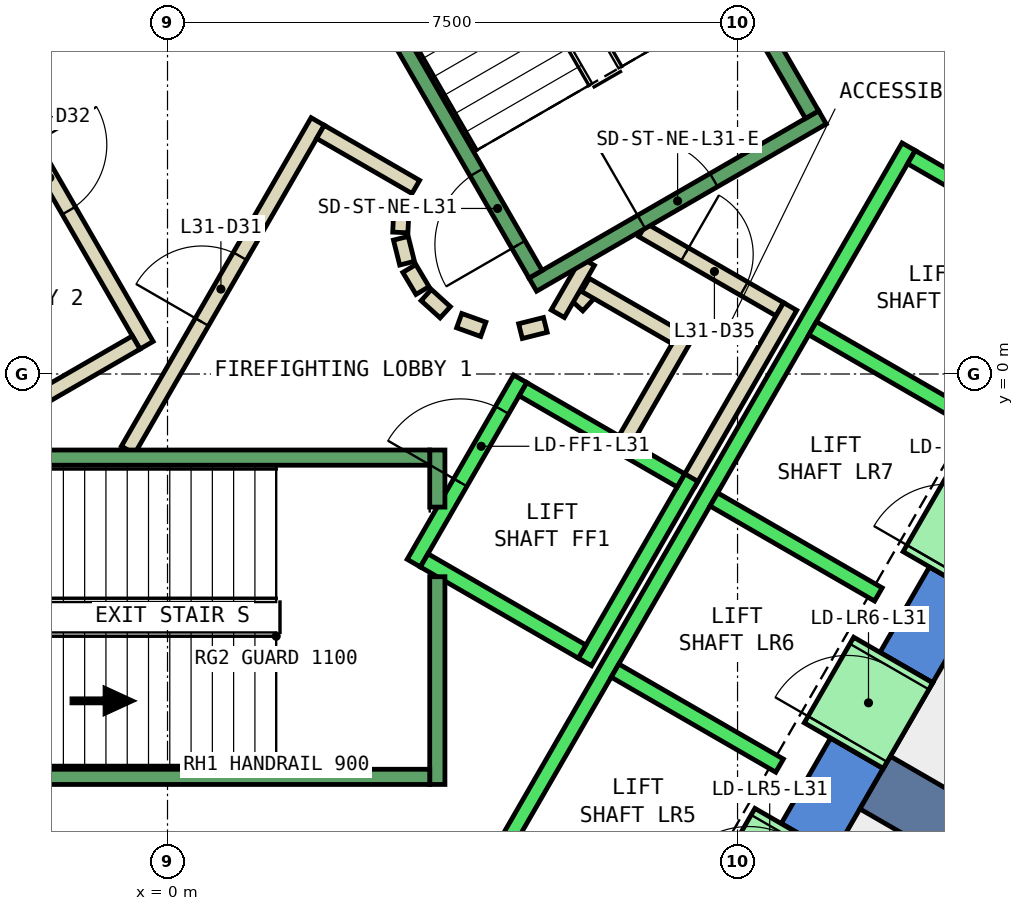
"""IFC4 building model, lengths in metres.
Left out: names, types, materials, properties, quantities, classifications, styles, units other than length and angle.
Written with IfcOpenShell. Run it as: python <this file> out.ifc"""

import sys

from ifc_helpers import new_model, si_unit, direction, frame, frame_2d, origin, place, context, subcontext, project, spatial, polyline, rectangle, outline, extrude, element, fill, save


model = new_model("IFC4")
c1 = context("Model", 3, precision=1e-05, world=origin(), true_north=direction((0.0, 1.0)))
c2 = subcontext(c1, "Body", "Model", "MODEL_VIEW")
j1 = project(units=[si_unit("LENGTHUNIT", "METRE"), si_unit("PLANEANGLEUNIT", "RADIAN")], contexts=[c1])
p1 = place(None, origin())
s1 = spatial("IfcSite", under=j1, at=p1, CompositionType="ELEMENT")
p2 = place(p1, origin())
s2 = spatial("IfcBuilding", under=s1, at=p2, CompositionType="ELEMENT")
p3 = place(p2, frame((0.0, 0.0, 142.4)))
s3 = spatial("IfcBuildingStorey", under=s2, at=p3, CompositionType="ELEMENT", Elevation=142.4)
p4 = place(p3, frame((0.0, 0.0, -0.4)))
e1 = element("IfcWall", 1, at=p4, inside=s3, PredefinedType="SHEAR", context=c2, shape_type="SweptSolid", body=[
    extrude(outline(polyline([(8.517, 11.748), (7.824, 11.348), (12.933, 2.5), (13.856, 2.5), (8.517, 11.748)])), origin(), (0.0, 0.0, 1.0), 4.2),
])
p5 = place(p3, frame((0.0, 0.0, -0.4)))
e2 = element("IfcWall", 2, at=p5, inside=s3, PredefinedType="SHEAR", context=c2, shape_type="SweptSolid", body=[
    extrude(outline(polyline([(9.417, -5.189), (8.724, -4.789), (8.075, -5.914), (8.767, -6.314), (9.417, -5.189)])), origin(), (0.0, 0.0, 1.0), 4.2),
])
p6 = place(p3, frame((0.0, 0.0, -0.4)))
e3 = element("IfcWall", 3, at=p6, inside=s3, PredefinedType="SHEAR", context=c2, shape_type="SweptSolid", body=[
    extrude(outline(polyline([(10.717, -2.937), (10.025, -2.537), (9.374, -3.663), (10.067, -4.063), (10.717, -2.937)])), origin(), (0.0, 0.0, 1.0), 4.2),
])
p7 = place(p3, frame((0.0, 0.0, 3.6)))
e4 = element("IfcWall", 4, at=p7, inside=s3, PredefinedType="SHEAR", context=c2, shape_type="SweptSolid", body=[
    extrude(outline(polyline([(8.767, -6.314), (8.075, -5.914), (7.424, -7.04), (8.117, -7.44), (8.767, -6.314)])), origin(), (0.0, 0.0, 1.0), 0.2),
])
p8 = place(p3, frame((0.0, 0.0, 3.6)))
e5 = element("IfcWall", 5, at=p8, inside=s3, PredefinedType="SHEAR", context=c2, shape_type="SweptSolid", body=[
    extrude(outline(polyline([(10.067, -4.063), (9.374, -3.663), (8.724, -4.789), (9.417, -5.189), (10.067, -4.063)])), origin(), (0.0, 0.0, 1.0), 0.2),
])
p9 = place(p3, frame((0.0, 0.0, 3.6)))
e6 = element("IfcWall", 6, at=p9, inside=s3, PredefinedType="SHEAR", context=c2, shape_type="SweptSolid", body=[
    extrude(outline(polyline([(11.367, -1.811), (10.675, -1.411), (10.025, -2.537), (10.717, -2.937), (11.367, -1.811)])), origin(), (0.0, 0.0, 1.0), 0.2),
])
p10 = place(p3, frame((9.31, -5.375, -0.4), z_axis=(0.0, 0.0, 1.0), x_axis=(0.866017533419, -0.500013631625, 0.0)))
e7 = element("IfcWall", 7, at=p10, inside=s3, PredefinedType="SHEAR", context=c2, shape_type="SweptSolid", body=[
    extrude(rectangle(XDim=9.0, YDim=0.8, at=frame_2d((4.5, 0.0))), origin(), (0.0, 0.0, 1.0), 4.2),
])
p11 = place(p3, frame((5.39, 0.898, 0.0), z_axis=(0.0, 0.0, 1.0), x_axis=(0.673828488714, 0.738887791073, 0.0)))
e8 = element("IfcWall", 8, at=p11, inside=s3, PredefinedType="PARTITIONING", context=c2, shape_type="SweptSolid", body=[
    extrude(rectangle(XDim=0.263, YDim=0.2, at=frame_2d((0.131, 0.0))), origin(), (0.0, 0.0, 1.0), 3.8),
])
p12 = place(p3, frame((5.499, 1.172, 0.0), z_axis=(0.0, 0.0, 1.0), x_axis=(0.866333505267, -0.499465972466, 0.0)))
e9 = element("IfcWall", 9, at=p12, inside=s3, PredefinedType="PARTITIONING", context=c2, shape_type="SweptSolid", body=[
    extrude(rectangle(XDim=1.374, YDim=0.2, at=frame_2d((0.687, 0.0))), origin(), (0.0, 0.0, 1.0), 3.8),
])
p13 = place(p3, frame((6.826, 0.522, 0.0), z_axis=(0.0, 0.0, 1.0), x_axis=(-0.500016722714, -0.866015748706, 0.0)))
e10 = element("IfcWall", 10, at=p13, inside=s3, PredefinedType="PARTITIONING", context=c2, shape_type="SweptSolid", body=[
    extrude(rectangle(XDim=1.7, YDim=0.2, at=frame_2d((0.85, 0.0))), origin(), (0.0, 0.0, 1.0), 3.8),
])
p14 = place(p3, frame((6.25, 1.894, 0.0), z_axis=(0.0, 0.0, 1.0), x_axis=(0.866043184279, -0.499969202016, 0.0)))
e11 = element("IfcWall", 11, at=p14, inside=s3, PredefinedType="PARTITIONING", context=c2, shape_type="SweptSolid", body=[
    extrude(rectangle(XDim=2.084, YDim=0.2, at=frame_2d((1.042, 0.0))), origin(), (0.0, 0.0, 1.0), 3.8),
])
p15 = place(p14, frame((0.642, 0.0, 0.0)))
e12 = element("IfcOpeningElement", 12, at=p15, cuts=e11, PredefinedType="OPENING", context=c2, shape_type="SweptSolid", body=[
    extrude(rectangle(XDim=0.9, YDim=2.1, at=frame_2d((0.45, 1.05))), frame((0.0, 0.11, 0.0), z_axis=(0.0, -1.0, 0.0), x_axis=(1.0, 0.0, 0.0)), (0.0, 0.0, 1.0), 0.22),
])
p16 = place(p3, frame((8.192, 0.888, 0.0), z_axis=(0.0, 0.0, 1.0), x_axis=(-0.499940625693, -0.866059680843, 0.0)))
e13 = element("IfcWall", 13, at=p16, inside=s3, PredefinedType="PARTITIONING", context=c2, shape_type="SweptSolid", body=[
    extrude(rectangle(XDim=2.68, YDim=0.2, at=frame_2d((1.34, 0.0))), origin(), (0.0, 0.0, 1.0), 3.8),
])
p17 = place(p3, frame((5.135, 0.793, 0.0), z_axis=(0.0, 0.0, 1.0), x_axis=(0.499526442893, 0.866298639529, 0.0)))
e14 = element("IfcWall", 14, at=p17, inside=s3, PredefinedType="PARTITIONING", context=c2, shape_type="SweptSolid", body=[
    extrude(rectangle(XDim=0.791, YDim=0.2, at=frame_2d((0.396, 0.0))), origin(), (0.0, 0.0, 1.0), 3.8),
])
p18 = place(p3, frame((-0.52, -1.0, 0.0), z_axis=(0.0, 0.0, 1.0), x_axis=(0.50011622646, 0.865958290007, 0.0)))
e15 = element("IfcWall", 15, at=p18, inside=s3, PredefinedType="PARTITIONING", context=c2, shape_type="SweptSolid", body=[
    extrude(rectangle(XDim=4.991, YDim=0.2, at=frame_2d((2.496, 0.0))), origin(), (0.0, 0.0, 1.0), 3.8),
])
p19 = place(p18, frame((1.945, 0.0, 0.0)))
e16 = element("IfcOpeningElement", 16, at=p19, cuts=e15, PredefinedType="OPENING", context=c2, shape_type="SweptSolid", body=[
    extrude(rectangle(XDim=1.0, YDim=2.1, at=frame_2d((0.5, 1.05))), frame((0.0, 0.11, 0.0), z_axis=(0.0, -1.0, 0.0), x_axis=(1.0, 0.0, 0.0)), (0.0, 0.0, 1.0), 0.22),
])
p20 = place(p3, frame((2.012, 3.186, 0.0), z_axis=(0.0, 0.0, 1.0), x_axis=(0.865891012941, -0.500232699559, 0.0)))
e17 = element("IfcWall", 17, at=p20, inside=s3, PredefinedType="PARTITIONING", context=c2, shape_type="SweptSolid", body=[
    extrude(rectangle(XDim=1.449, YDim=0.2, at=frame_2d((0.725, 0.0))), origin(), (0.0, 0.0, 1.0), 3.8),
])
p21 = place(p3, frame((3.079, 2.199, 0.0), z_axis=(0.0, 0.0, 1.0), x_axis=(-0.047771483479, -0.998858290933, 0.0)))
e18 = element("IfcWall", 18, at=p21, inside=s3, PredefinedType="PARTITIONING", context=c2, shape_type="SweptSolid", body=[
    extrude(rectangle(XDim=0.337, YDim=0.2, at=frame_2d((0.169, 0.0))), origin(), (0.0, 0.0, 1.0), 3.8),
])
p22 = place(p3, frame((3.07, 1.786, 0.0), z_axis=(0.0, 0.0, 1.0), x_axis=(0.242705583207, -0.970099994784, 0.0)))
e19 = element("IfcWall", 19, at=p22, inside=s3, PredefinedType="PARTITIONING", context=c2, shape_type="SweptSolid", body=[
    extrude(rectangle(XDim=0.338, YDim=0.2, at=frame_2d((0.169, 0.0))), origin(), (0.0, 0.0, 1.0), 3.8),
])
for number, where, z_axis, x_axis in (
    (20, (3.182, 1.388, 0.0), (0.0, 0.0, 1.0), (0.512, -0.859, 0.0)),
    (21, (3.404, 1.039, 0.0), (0.0, 0.0, 1.0), (0.74, -0.672, 0.0)),
):
    element("IfcWall", number, at=place(p3, frame(where, z_axis=z_axis, x_axis=x_axis)), inside=s3, PredefinedType="PARTITIONING", context=c2, shape_type="SweptSolid", body=[
        extrude(rectangle(XDim=0.338, YDim=0.2, at=frame_2d((0.169, 0.0))), origin(), (0.0, 0.0, 1.0), 3.8),
    ])
p23 = place(p3, frame((3.838, 0.702, 0.0), z_axis=(0.0, 0.0, 1.0), x_axis=(0.941035081519, -0.338308993895, 0.0)))
e22 = element("IfcWall", 22, at=p23, inside=s3, PredefinedType="PARTITIONING", context=c2, shape_type="SweptSolid", body=[
    extrude(rectangle(XDim=0.337, YDim=0.2, at=frame_2d((0.168, 0.0))), origin(), (0.0, 0.0, 1.0), 3.8),
])
p24 = place(p3, frame((4.644, 0.564, 0.0), z_axis=(0.0, 0.0, 1.0), x_axis=(0.969929076366, 0.243387729394, 0.0)))
e23 = element("IfcWall", 23, at=p24, inside=s3, PredefinedType="PARTITIONING", context=c2, shape_type="SweptSolid", body=[
    extrude(rectangle(XDim=0.337, YDim=0.2, at=frame_2d((0.168, 0.0))), origin(), (0.0, 0.0, 1.0), 3.8),
])
p25 = place(p3, frame((-2.771, 4.7, 0.0), z_axis=(0.0, 0.0, 1.0), x_axis=(0.499969479948, -0.866043023828, 0.0)))
e24 = element("IfcWall", 24, at=p25, inside=s3, PredefinedType="PARTITIONING", context=c2, shape_type="SweptSolid", body=[
    extrude(rectangle(XDim=4.99, YDim=0.2, at=frame_2d((2.495, 0.0))), origin(), (0.0, 0.0, 1.0), 3.8),
])
p26 = place(p25, frame((1.945, 0.0, 0.0)))
e25 = element("IfcOpeningElement", 25, at=p26, cuts=e24, PredefinedType="OPENING", context=c2, shape_type="SweptSolid", body=[
    extrude(rectangle(XDim=1.0, YDim=2.1, at=frame_2d((0.5, 1.05))), frame((0.0, 0.11, 0.0), z_axis=(0.0, -1.0, 0.0), x_axis=(1.0, 0.0, 0.0)), (0.0, 0.0, 1.0), 0.22),
])
p27 = place(p3, frame((-0.412, 0.414, 0.0), z_axis=(0.0, 0.0, 1.0), x_axis=(-0.866017369001, -0.500013916395, 0.0)))
e26 = element("IfcWall", 26, at=p27, inside=s3, PredefinedType="PARTITIONING", context=c2, shape_type="SweptSolid", body=[
    extrude(rectangle(XDim=1.45, YDim=0.2, at=frame_2d((0.725, 0.0))), origin(), (0.0, 0.0, 1.0), 3.8),
])
p28 = place(p3, frame((3.24, -2.488, 0.0), z_axis=(0.0, 0.0, 1.0), x_axis=(0.49994636267, 0.866056369097, 0.0)))
e27 = element("IfcWall", 27, at=p28, inside=s3, PredefinedType="STANDARD", context=c2, shape_type="SweptSolid", body=[
    extrude(rectangle(XDim=2.8, YDim=0.2, at=frame_2d((1.4, 0.0))), origin(), (0.0, 0.0, 1.0), 3.8),
])
p29 = place(p28, frame((1.225, 0.0, 0.0)))
e28 = element("IfcOpeningElement", 28, at=p29, cuts=e27, PredefinedType="OPENING", context=c2, shape_type="SweptSolid", body=[
    extrude(rectangle(XDim=1.1, YDim=2.1, at=frame_2d((0.55, 1.05))), frame((0.0, 0.11, 0.0), z_axis=(0.0, -1.0, 0.0), x_axis=(1.0, 0.0, 0.0)), (0.0, 0.0, 1.0), 0.22),
])
p30 = place(p3, frame((5.492, -3.788, 0.0), z_axis=(0.0, 0.0, 1.0), x_axis=(0.500011755427, 0.866018616679, 0.0)))
e29 = element("IfcWall", 29, at=p30, inside=s3, PredefinedType="STANDARD", context=c2, shape_type="SweptSolid", body=[
    extrude(rectangle(XDim=2.8, YDim=0.2, at=frame_2d((1.4, 0.0))), origin(), (0.0, 0.0, 1.0), 3.8),
])
p31 = place(p3, frame((3.377, -2.452, 0.0), z_axis=(0.0, 0.0, 1.0), x_axis=(0.865955154139, -0.50012165622, 0.0)))
e30 = element("IfcWall", 30, at=p31, inside=s3, PredefinedType="STANDARD", context=c2, shape_type="SweptSolid", body=[
    extrude(rectangle(XDim=2.4, YDim=0.2, at=frame_2d((1.2, 0.0))), origin(), (0.0, 0.0, 1.0), 3.8),
])
p32 = place(p3, frame((4.677, -0.2, 0.0), z_axis=(0.0, 0.0, 1.0), x_axis=(0.865973769406, -0.500089422704, 0.0)))
e31 = element("IfcWall", 31, at=p32, inside=s3, PredefinedType="STANDARD", context=c2, shape_type="SweptSolid", body=[
    extrude(rectangle(XDim=2.399, YDim=0.2, at=frame_2d((1.2, 0.0))), origin(), (0.0, 0.0, 1.0), 3.8),
])
p33 = place(p3, frame((4.451, -6.19, 0.0), z_axis=(0.0, 0.0, 1.0), x_axis=(0.50000090737, 0.866024879913, 0.0)))
e32 = element("IfcWall", 32, at=p33, inside=s3, PredefinedType="STANDARD", context=c2, shape_type="SweptSolid", body=[
    extrude(rectangle(XDim=10.6, YDim=0.2, at=frame_2d((5.3, 0.0))), origin(), (0.0, 0.0, 1.0), 3.8),
])
for number, where, z_axis, x_axis in (
    (33, (5.888, -3.902, 0.0), (0.0, 0.0, 1.0), (0.866, -0.5, 0.0)),
    (34, (7.188, -1.65, 0.0), (0.0, 0.0, 1.0), (0.866, -0.5, 0.0)),
    (35, (8.488, 0.602, 0.0), (0.0, 0.0, 1.0), (0.866, -0.5, 0.0)),
):
    element("IfcWall", number, at=place(p3, frame(where, z_axis=z_axis, x_axis=x_axis)), inside=s3, PredefinedType="STANDARD", context=c2, shape_type="SweptSolid", body=[
        extrude(rectangle(XDim=2.5, YDim=0.2, at=frame_2d((1.25, 0.0))), origin(), (0.0, 0.0, 1.0), 3.8),
    ])
p34 = place(p3, frame((9.788, 2.853, 0.0), z_axis=(0.0, 0.0, 1.0), x_axis=(0.865998541277, -0.500046524342, 0.0)))
e36 = element("IfcWall", 36, at=p34, inside=s3, PredefinedType="STANDARD", context=c2, shape_type="SweptSolid", body=[
    extrude(rectangle(XDim=2.5, YDim=0.2, at=frame_2d((1.25, 0.0))), origin(), (0.0, 0.0, 1.0), 3.8),
])
p35 = place(p3, frame((7.598, -7.14, 0.0), z_axis=(0.0, 0.0, 1.0), x_axis=(0.500362116554, 0.865816234728, 0.0)))
e37 = element("IfcWall", 37, at=p35, inside=s3, PredefinedType="STANDARD", context=c2, shape_type="SweptSolid", body=[
    extrude(rectangle(XDim=1.299, YDim=1.2, at=frame_2d((0.65, 0.0))), origin(), (0.0, 0.0, 1.0), 2.4),
])
p36 = place(p35, frame((0.1, 0.0, 0.0)))
e38 = element("IfcOpeningElement", 38, at=p36, cuts=e37, PredefinedType="OPENING", context=c2, shape_type="SweptSolid", body=[
    extrude(rectangle(XDim=1.1, YDim=2.3, at=frame_2d((0.55, 1.15))), frame((0.0, 0.61, 0.0), z_axis=(0.0, -1.0, 0.0), x_axis=(1.0, 0.0, 0.0)), (0.0, 0.0, 1.0), 1.22),
])
p37 = place(p3, frame((8.898, -4.889, 0.0), z_axis=(0.0, 0.0, 1.0), x_axis=(0.500036693733, 0.866004217611, 0.0)))
e39 = element("IfcWall", 39, at=p37, inside=s3, PredefinedType="STANDARD", context=c2, shape_type="SweptSolid", body=[
    extrude(rectangle(XDim=1.3, YDim=1.2, at=frame_2d((0.65, 0.0))), origin(), (0.0, 0.0, 1.0), 2.4),
])
p38 = place(p37, frame((0.1, 0.0, 0.0)))
e40 = element("IfcOpeningElement", 40, at=p38, cuts=e39, PredefinedType="OPENING", context=c2, shape_type="SweptSolid", body=[
    extrude(rectangle(XDim=1.1, YDim=2.3, at=frame_2d((0.55, 1.15))), frame((0.0, 0.61, 0.0), z_axis=(0.0, -1.0, 0.0), x_axis=(1.0, 0.0, 0.0)), (0.0, 0.0, 1.0), 1.22),
])
p39 = place(p3, frame((10.198, -2.637, 0.0), z_axis=(0.0, 0.0, 1.0), x_axis=(0.49989585183, 0.866085525409, 0.0)))
e41 = element("IfcWall", 41, at=p39, inside=s3, PredefinedType="STANDARD", context=c2, shape_type="SweptSolid", body=[
    extrude(rectangle(XDim=1.3, YDim=1.2, at=frame_2d((0.65, 0.0))), origin(), (0.0, 0.0, 1.0), 2.4),
])
p40 = place(p39, frame((0.1, 0.0, 0.0)))
e42 = element("IfcOpeningElement", 42, at=p40, cuts=e41, PredefinedType="OPENING", context=c2, shape_type="SweptSolid", body=[
    extrude(rectangle(XDim=1.1, YDim=2.3, at=frame_2d((0.55, 1.15))), frame((0.0, 0.61, 0.0), z_axis=(0.0, -1.0, 0.0), x_axis=(1.0, 0.0, 0.0)), (0.0, 0.0, 1.0), 1.22),
])
p41 = place(p3, frame((3.55, -2.667, 0.0), z_axis=(0.0, 0.0, 1.0), x_axis=(0.0, -1.0, 0.0)))
e43 = element("IfcWall", 43, at=p41, inside=s3, PredefinedType="STANDARD", context=c2, shape_type="SweptSolid", body=[
    extrude(rectangle(XDim=2.733, YDim=0.2, at=frame_2d((1.366, 0.0))), origin(), (0.0, 0.0, 1.0), 3.8),
])
p42 = place(p3, frame((3.55, -1.0, 0.0), z_axis=(0.0, 0.0, 1.0), x_axis=(0.0, -1.0, 0.0)))
e44 = element("IfcWall", 44, at=p42, inside=s3, PredefinedType="STANDARD", context=c2, shape_type="SweptSolid", body=[
    extrude(rectangle(XDim=0.751, YDim=0.2, at=frame_2d((0.375, 0.0))), origin(), (0.0, 0.0, 1.0), 3.8),
])
p43 = place(p3, frame((-3.45, -1.1, 0.0), z_axis=(0.0, 0.0, 1.0), x_axis=(1.0, 0.0, 0.0)))
e45 = element("IfcWall", 45, at=p43, inside=s3, PredefinedType="STANDARD", context=c2, shape_type="SweptSolid", body=[
    extrude(rectangle(XDim=6.9, YDim=0.2, at=frame_2d((3.45, 0.0))), origin(), (0.0, 0.0, 1.0), 3.8),
])
p44 = place(p43, frame((0.45, 0.0, 0.0)))
e46 = element("IfcOpeningElement", 46, at=p44, cuts=e45, PredefinedType="OPENING", context=c2, shape_type="SweptSolid", body=[
    extrude(rectangle(XDim=1.1, YDim=2.2, at=frame_2d((0.55, 1.1))), frame((0.0, 0.11, 0.0), z_axis=(0.0, -1.0, 0.0), x_axis=(1.0, 0.0, 0.0)), (0.0, 0.0, 1.0), 0.22),
])
p45 = place(p3, frame((-3.45, -5.3, 0.0), z_axis=(0.0, 0.0, 1.0), x_axis=(1.0, 0.0, 0.0)))
e47 = element("IfcWall", 47, at=p45, inside=s3, PredefinedType="STANDARD", context=c2, shape_type="SweptSolid", body=[
    extrude(rectangle(XDim=6.9, YDim=0.2, at=frame_2d((3.45, 0.0))), origin(), (0.0, 0.0, 1.0), 3.8),
])
p46 = place(p3, frame((4.806, 1.176, 0.0), z_axis=(0.0, 0.0, 1.0), x_axis=(0.866059941101, 0.499940174841, 0.0)))
e48 = element("IfcWall", 48, at=p46, inside=s3, PredefinedType="STANDARD", context=c2, shape_type="SweptSolid", body=[
    extrude(rectangle(XDim=4.4, YDim=0.2, at=frame_2d((2.2, 0.0))), origin(), (0.0, 0.0, 1.0), 3.8),
])
p47 = place(p46, frame((1.65, 0.0, 0.0)))
e49 = element("IfcOpeningElement", 49, at=p47, cuts=e48, PredefinedType="OPENING", context=c2, shape_type="SweptSolid", body=[
    extrude(rectangle(XDim=1.1, YDim=2.2, at=frame_2d((0.55, 1.1))), frame((0.0, 0.11, 0.0), z_axis=(0.0, -1.0, 0.0), x_axis=(1.0, 0.0, 0.0)), (0.0, 0.0, 1.0), 0.22),
])
p48 = place(p3, frame((4.843, 1.312, 0.0), z_axis=(0.0, 0.0, 1.0), x_axis=(-0.499963383562, 0.866046543262, 0.0)))
e50 = element("IfcWall", 50, at=p48, inside=s3, PredefinedType="STANDARD", context=c2, shape_type="SweptSolid", body=[
    extrude(rectangle(XDim=6.9, YDim=0.2, at=frame_2d((3.45, 0.0))), origin(), (0.0, 0.0, 1.0), 3.8),
])
p49 = place(p48, frame((0.45, 0.0, 0.0)))
e51 = element("IfcOpeningElement", 51, at=p49, cuts=e50, PredefinedType="OPENING", context=c2, shape_type="SweptSolid", body=[
    extrude(rectangle(XDim=1.1, YDim=2.2, at=frame_2d((0.55, 1.1))), frame((0.0, 0.11, 0.0), z_axis=(0.0, -1.0, 0.0), x_axis=(1.0, 0.0, 0.0)), (0.0, 0.0, 1.0), 0.22),
])
p50 = place(p3, frame((8.48, 3.412, 0.0), z_axis=(0.0, 0.0, 1.0), x_axis=(-0.499978703459, 0.866037698999, 0.0)))
e52 = element("IfcWall", 52, at=p50, inside=s3, PredefinedType="STANDARD", context=c2, shape_type="SweptSolid", body=[
    extrude(rectangle(XDim=6.9, YDim=0.2, at=frame_2d((3.45, 0.0))), origin(), (0.0, 0.0, 1.0), 3.8),
])
p51 = place(p3, frame((-1.393, 7.288, 0.0), z_axis=(0.0, 0.0, 1.0), x_axis=(-0.499963383562, -0.866046543262, 0.0)))
e53 = element("IfcWall", 53, at=p51, inside=s3, PredefinedType="STANDARD", context=c2, shape_type="SweptSolid", body=[
    extrude(rectangle(XDim=6.9, YDim=0.2, at=frame_2d((3.45, 0.0))), origin(), (0.0, 0.0, 1.0), 3.8),
])
p52 = place(p51, frame((0.45, 0.0, 0.0)))
e54 = element("IfcOpeningElement", 54, at=p52, cuts=e53, PredefinedType="OPENING", context=c2, shape_type="SweptSolid", body=[
    extrude(rectangle(XDim=1.1, YDim=2.2, at=frame_2d((0.55, 1.1))), frame((0.0, 0.11, 0.0), z_axis=(0.0, -1.0, 0.0), x_axis=(1.0, 0.0, 0.0)), (0.0, 0.0, 1.0), 0.22),
])
p53 = place(p19, origin())
e55 = element("IfcDoor", 55, at=p53, inside=s3, OperationType="SINGLE_SWING_LEFT", PredefinedType="DOOR", context=c2, shape_type="SweptSolid", body=[
    extrude(rectangle(XDim=1.0, YDim=2.1, at=frame_2d((0.5, 1.05))), frame((0.0, 0.025, 0.0), z_axis=(0.0, -1.0, 0.0), x_axis=(1.0, 0.0, 0.0)), (0.0, 0.0, 1.0), 0.05),
])
fill(e16, e55)
p54 = place(p26, origin())
e56 = element("IfcDoor", 56, at=p54, inside=s3, OperationType="SINGLE_SWING_RIGHT", PredefinedType="DOOR", context=c2, shape_type="SweptSolid", body=[
    extrude(rectangle(XDim=1.0, YDim=2.1, at=frame_2d((0.5, 1.05))), frame((0.0, 0.025, 0.0), z_axis=(0.0, -1.0, 0.0), x_axis=(1.0, 0.0, 0.0)), (0.0, 0.0, 1.0), 0.05),
])
fill(e25, e56)
p55 = place(p15, origin())
e57 = element("IfcDoor", 57, at=p55, inside=s3, OperationType="SINGLE_SWING_LEFT", PredefinedType="DOOR", context=c2, shape_type="SweptSolid", body=[
    extrude(rectangle(XDim=0.9, YDim=2.1, at=frame_2d((0.45, 1.05))), frame((0.0, 0.025, 0.0), z_axis=(0.0, -1.0, 0.0), x_axis=(1.0, 0.0, 0.0)), (0.0, 0.0, 1.0), 0.05),
])
fill(e12, e57)
p56 = place(p38, origin())
e58 = element("IfcDoor", 58, at=p56, inside=s3, OperationType="SLIDING_TO_LEFT", PredefinedType="DOOR", context=c2, shape_type="SweptSolid", body=[
    extrude(rectangle(XDim=1.1, YDim=2.3, at=frame_2d((0.55, 1.15))), frame((0.0, 0.025, 0.0), z_axis=(0.0, -1.0, 0.0), x_axis=(1.0, 0.0, 0.0)), (0.0, 0.0, 1.0), 0.05),
])
fill(e40, e58)
p57 = place(p29, origin())
e59 = element("IfcDoor", 59, at=p57, inside=s3, OperationType="SLIDING_TO_LEFT", PredefinedType="DOOR", context=c2, shape_type="SweptSolid", body=[
    extrude(rectangle(XDim=1.1, YDim=2.1, at=frame_2d((0.55, 1.05))), frame((0.0, 0.025, 0.0), z_axis=(0.0, -1.0, 0.0), x_axis=(1.0, 0.0, 0.0)), (0.0, 0.0, 1.0), 0.05),
])
fill(e28, e59)
p58 = place(p49, origin())
e60 = element("IfcDoor", 60, at=p58, inside=s3, OperationType="SINGLE_SWING_LEFT", PredefinedType="DOOR", context=c2, shape_type="SweptSolid", body=[
    extrude(rectangle(XDim=1.1, YDim=2.2, at=frame_2d((0.55, 1.1))), frame((0.0, 0.025, 0.0), z_axis=(0.0, -1.0, 0.0), x_axis=(1.0, 0.0, 0.0)), (0.0, 0.0, 1.0), 0.05),
])
fill(e51, e60)
p59 = place(p47, origin())
e61 = element("IfcDoor", 61, at=p59, inside=s3, OperationType="SINGLE_SWING_LEFT", PredefinedType="DOOR", context=c2, shape_type="SweptSolid", body=[
    extrude(rectangle(XDim=1.1, YDim=2.2, at=frame_2d((0.55, 1.1))), frame((0.0, 0.025, 0.0), z_axis=(0.0, -1.0, 0.0), x_axis=(1.0, 0.0, 0.0)), (0.0, 0.0, 1.0), 0.05),
])
fill(e49, e61)
save(model, sys.argv[1])
